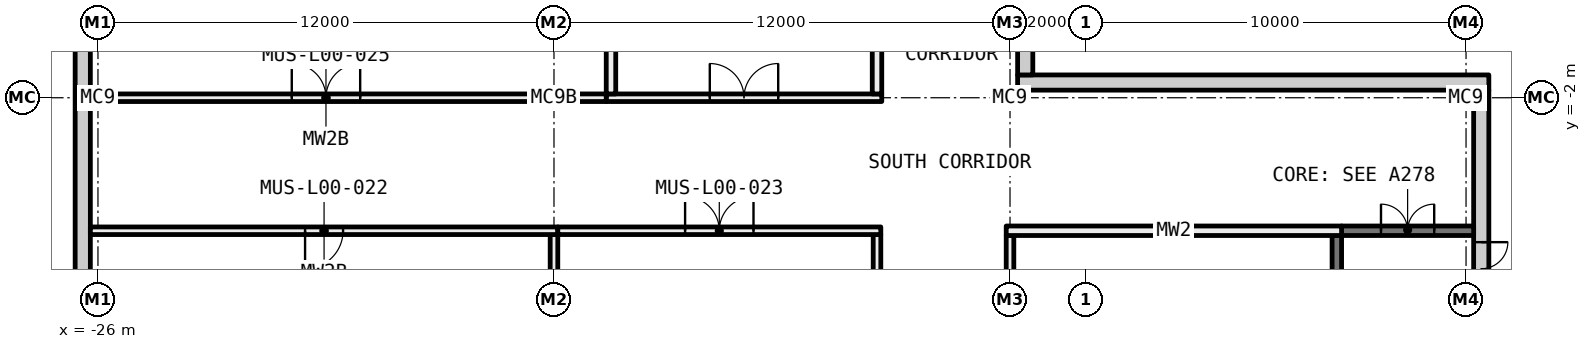
"""IFC4 building model, lengths in metres.
Left out: names, types, materials, properties, quantities, classifications, styles, units other than length and angle.
Written with IfcOpenShell. Run it as: python <this file> out.ifc"""

import sys

from ifc_helpers import new_model, si_unit, direction, frame, frame_2d, origin, origin_2d, place, context, subcontext, project, spatial, rectangle, i_section, extrude, element, fill, save


model = new_model("IFC4")
c1 = context("Model", 3, precision=1e-05, world=origin(), true_north=direction((0.0, 1.0)))
c2 = subcontext(c1, "Body", "Model", "MODEL_VIEW")
j1 = project(units=[si_unit("LENGTHUNIT", "METRE"), si_unit("PLANEANGLEUNIT", "RADIAN")], contexts=[c1])
p1 = place(None, origin())
s1 = spatial("IfcSite", under=j1, at=p1, CompositionType="ELEMENT")
p2 = place(p1, origin())
s2 = spatial("IfcBuilding", under=s1, at=p2, CompositionType="ELEMENT")
p3 = place(p2, origin())
s3 = spatial("IfcBuildingStorey", under=s2, at=p3, CompositionType="ELEMENT", Elevation=0.0)
for number, where, z_axis, x_axis in (
    (1, (-26.0, -2.0, -1.0), (0.0, 0.0, 1.0), (1.0, 0.0, 0.0)),
    (2, (-14.0, -2.0, -1.0), (0.0, 0.0, 1.0), (1.0, 0.0, 0.0)),
    (3, (-2.0, -2.0, -1.0), (0.0, 0.0, 1.0), (1.0, 0.0, 0.0)),
    (4, (10.0, -2.0, -1.0), (0.0, 0.0, 1.0), (1.0, 0.0, 0.0)),
):
    element("IfcColumn", number, at=place(p3, frame(where, z_axis=z_axis, x_axis=x_axis)), inside=s3, PredefinedType="COLUMN", context=c2, shape_type="SweptSolid", body=[
        extrude(i_section(OverallWidth=0.4, OverallDepth=0.4, WebThickness=0.013, FlangeThickness=0.021, FilletRadius=0.022, at=origin_2d()), origin(), (0.0, 0.0, 1.0), 6.6),
    ])
p4 = place(p3, frame((-14.0, -11.9, 0.0), z_axis=(0.0, 0.0, 1.0), x_axis=(0.0, 1.0, 0.0)))
e5 = element("IfcWall", 5, at=p4, inside=s3, PredefinedType="PARTITIONING", context=c2, shape_type="SweptSolid", body=[
    extrude(rectangle(XDim=6.3, YDim=0.2, at=frame_2d((3.15, 0.0))), origin(), (0.0, 0.0, 1.0), 5.012),
])
p5 = place(p3, frame((-26.2, -5.5, 0.0), z_axis=(0.0, 0.0, 1.0), x_axis=(1.0, 0.0, 0.0)))
e6 = element("IfcWall", 6, at=p5, inside=s3, PredefinedType="PARTITIONING", context=c2, shape_type="SweptSolid", body=[
    extrude(rectangle(XDim=12.3, YDim=0.2, at=frame_2d((6.15, 0.0))), origin(), (0.0, 0.0, 1.0), 5.6),
])
p6 = place(p5, frame((5.65, 0.0, 0.0)))
e7 = element("IfcOpeningElement", 7, at=p6, cuts=e6, PredefinedType="OPENING", context=c2, shape_type="SweptSolid", body=[
    extrude(rectangle(XDim=1.0, YDim=2.1, at=frame_2d((0.5, 1.05))), frame((0.0, 0.11, 0.0), z_axis=(0.0, -1.0, 0.0), x_axis=(1.0, 0.0, 0.0)), (0.0, 0.0, 1.0), 0.22),
])
p7 = place(p3, frame((-12.625, -2.0, 0.0), z_axis=(0.0, 0.0, 1.0), x_axis=(1.0, 0.0, 0.0)))
e8 = element("IfcWall", 8, at=p7, inside=s3, PredefinedType="PARTITIONING", context=c2, shape_type="SweptSolid", body=[
    extrude(rectangle(XDim=7.25, YDim=0.2, at=frame_2d((3.625, 0.0))), origin(), (0.0, 0.0, 1.0), 5.012),
])
p8 = place(p7, frame((2.725, 0.0, 0.0)))
e9 = element("IfcOpeningElement", 9, at=p8, cuts=e8, PredefinedType="OPENING", context=c2, shape_type="SweptSolid", body=[
    extrude(rectangle(XDim=1.8, YDim=2.1, at=frame_2d((0.9, 1.05))), frame((0.0, 0.11, 0.0), z_axis=(0.0, -1.0, 0.0), x_axis=(1.0, 0.0, 0.0)), (0.0, 0.0, 1.0), 0.22),
])
p9 = place(p3, frame((-5.5, -1.9, 0.0), z_axis=(0.0, 0.0, 1.0), x_axis=(0.0, 1.0, 0.0)))
e10 = element("IfcWall", 10, at=p9, inside=s3, PredefinedType="PARTITIONING", context=c2, shape_type="SweptSolid", body=[
    extrude(rectangle(XDim=2.975, YDim=0.25, at=frame_2d((1.487, 0.0))), origin(), (0.0, 0.0, 1.0), 5.6),
])
p10 = place(p3, frame((-25.8, -2.0, 0.0), z_axis=(0.0, 0.0, 1.0), x_axis=(1.0, 0.0, 0.0)))
e11 = element("IfcWall", 11, at=p10, inside=s3, PredefinedType="PARTITIONING", context=c2, shape_type="SweptSolid", body=[
    extrude(rectangle(XDim=11.6, YDim=0.2, at=frame_2d((5.8, 0.0))), origin(), (0.0, 0.0, 1.0), 5.012),
])
p11 = place(p10, frame((4.9, 0.0, 0.0)))
e12 = element("IfcOpeningElement", 12, at=p11, cuts=e11, PredefinedType="OPENING", context=c2, shape_type="SweptSolid", body=[
    extrude(rectangle(XDim=1.8, YDim=2.1, at=frame_2d((0.9, 1.05))), frame((0.0, 0.11, 0.0), z_axis=(0.0, -1.0, 0.0), x_axis=(1.0, 0.0, 0.0)), (0.0, 0.0, 1.0), 0.22),
])
p12 = place(p3, frame((-13.8, -2.0, 0.0), z_axis=(0.0, 0.0, 1.0), x_axis=(1.0, 0.0, 0.0)))
e13 = element("IfcWall", 13, at=p12, inside=s3, PredefinedType="PARTITIONING", context=c2, shape_type="SweptSolid", body=[
    extrude(rectangle(XDim=1.175, YDim=0.2, at=frame_2d((0.587, 0.0))), origin(), (0.0, 0.0, 1.0), 5.012),
])
p13 = place(p3, frame((-5.5, -14.875, 0.0), z_axis=(0.0, 0.0, 1.0), x_axis=(0.0, 1.0, 0.0)))
e14 = element("IfcWall", 14, at=p13, inside=s3, PredefinedType="PARTITIONING", context=c2, shape_type="SweptSolid", body=[
    extrude(rectangle(XDim=9.275, YDim=0.2, at=frame_2d((4.637, 0.0))), origin(), (0.0, 0.0, 1.0), 5.6),
])
p14 = place(p3, frame((-13.9, -5.5, 0.0), z_axis=(0.0, 0.0, 1.0), x_axis=(1.0, 0.0, 0.0)))
e15 = element("IfcWall", 15, at=p14, inside=s3, PredefinedType="PARTITIONING", context=c2, shape_type="SweptSolid", body=[
    extrude(rectangle(XDim=8.5, YDim=0.2, at=frame_2d((4.25, 0.0))), origin(), (0.0, 0.0, 1.0), 5.6),
])
p15 = place(p14, frame((3.35, 0.0, 0.0)))
e16 = element("IfcOpeningElement", 16, at=p15, cuts=e15, PredefinedType="OPENING", context=c2, shape_type="SweptSolid", body=[
    extrude(rectangle(XDim=1.8, YDim=2.1, at=frame_2d((0.9, 1.05))), frame((0.0, 0.11, 0.0), z_axis=(0.0, -1.0, 0.0), x_axis=(1.0, 0.0, 0.0)), (0.0, 0.0, 1.0), 0.22),
])
p16 = place(p3, frame((-2.0, -13.8, 0.0), z_axis=(0.0, 0.0, 1.0), x_axis=(0.0, 1.0, 0.0)))
e17 = element("IfcWall", 17, at=p16, inside=s3, PredefinedType="PARTITIONING", context=c2, shape_type="SweptSolid", body=[
    extrude(rectangle(XDim=8.175, YDim=0.2, at=frame_2d((4.087, 0.0))), origin(), (0.0, 0.0, 1.0), 5.012),
])
p17 = place(p16, frame((3.588, 0.0, 0.0)))
e18 = element("IfcOpeningElement", 18, at=p17, cuts=e17, PredefinedType="OPENING", context=c2, shape_type="SweptSolid", body=[
    extrude(rectangle(XDim=1.0, YDim=2.1, at=frame_2d((0.5, 1.05))), frame((0.0, 0.11, 0.0), z_axis=(0.0, -1.0, 0.0), x_axis=(1.0, 0.0, 0.0)), (0.0, 0.0, 1.0), 0.22),
])
p18 = place(p3, frame((-2.1, -5.5, 0.0), z_axis=(0.0, 0.0, 1.0), x_axis=(1.0, 0.0, 0.0)))
e19 = element("IfcWall", 19, at=p18, inside=s3, PredefinedType="PARTITIONING", context=c2, shape_type="SweptSolid", body=[
    extrude(rectangle(XDim=8.825, YDim=0.25, at=frame_2d((4.413, 0.0))), origin(), (0.0, 0.0, 1.0), 5.6),
])
p19 = place(p3, frame((6.725, -5.5, -1.0), z_axis=(0.0, 0.0, 1.0), x_axis=(1.0, 0.0, 0.0)))
e20 = element("IfcWall", 20, at=p19, inside=s3, PredefinedType="SHEAR", context=c2, shape_type="SweptSolid", body=[
    extrude(rectangle(XDim=3.475, YDim=0.25, at=frame_2d((1.737, 0.0))), origin(), (0.0, 0.0, 1.0), 6.6),
])
p20 = place(p19, frame((1.037, 0.0, 1.0)))
e21 = element("IfcOpeningElement", 21, at=p20, cuts=e20, PredefinedType="OPENING", context=c2, shape_type="SweptSolid", body=[
    extrude(rectangle(XDim=1.4, YDim=2.1, at=frame_2d((0.7, 1.05))), frame((0.0, 0.135, 0.0), z_axis=(0.0, -1.0, 0.0), x_axis=(1.0, 0.0, 0.0)), (0.0, 0.0, 1.0), 0.27),
])
p21 = place(p3, frame((-12.5, -1.9, 0.0), z_axis=(0.0, 0.0, 1.0), x_axis=(0.0, 1.0, 0.0)))
e22 = element("IfcWall", 22, at=p21, inside=s3, PredefinedType="PARTITIONING", context=c2, shape_type="SweptSolid", body=[
    extrude(rectangle(XDim=2.975, YDim=0.25, at=frame_2d((1.487, 0.0))), origin(), (0.0, 0.0, 1.0), 5.6),
])
p22 = place(p3, frame((6.6, -14.875, -1.0), z_axis=(0.0, 0.0, 1.0), x_axis=(0.0, 1.0, 0.0)))
e23 = element("IfcWall", 23, at=p22, inside=s3, PredefinedType="SHEAR", context=c2, shape_type="SweptSolid", body=[
    extrude(rectangle(XDim=9.25, YDim=0.25, at=frame_2d((4.625, 0.0))), origin(), (0.0, 0.0, 1.0), 6.6),
])
p23 = place(p3, frame((-26.4, -26.2, -0.4), z_axis=(0.0, 0.0, 1.0), x_axis=(0.0, 1.0, 0.0)))
e24 = element("IfcWall", 24, at=p23, inside=s3, PredefinedType="STANDARD", context=c2, shape_type="SweptSolid", body=[
    extrude(rectangle(XDim=72.4, YDim=0.4, at=frame_2d((36.2, 0.0))), origin(), (0.0, 0.0, 1.0), 6.0),
])
p24 = place(p23, frame((29.4, 0.0, 0.4)))
e25 = element("IfcOpeningElement", 25, at=p24, cuts=e24, PredefinedType="OPENING", context=c2, shape_type="SweptSolid", body=[
    extrude(rectangle(XDim=3.6, YDim=4.2, at=frame_2d((1.8, 2.1))), frame((0.0, 0.21, 0.0), z_axis=(0.0, -1.0, 0.0), x_axis=(1.0, 0.0, 0.0)), (0.0, 0.0, 1.0), 0.42),
])
p25 = place(p23, frame((2.0, 0.0, 0.4)))
e26 = element("IfcOpeningElement", 26, at=p25, cuts=e24, PredefinedType="OPENING", context=c2, shape_type="SweptSolid", body=[
    extrude(rectangle(XDim=2.4, YDim=2.4, at=frame_2d((1.2, 1.2))), frame((0.0, 0.21, 0.0), z_axis=(0.0, -1.0, 0.0), x_axis=(1.0, 0.0, 0.0)), (0.0, 0.0, 1.0), 0.42),
])
p26 = place(p23, frame((7.5, 0.0, 0.4)))
e27 = element("IfcOpeningElement", 27, at=p26, cuts=e24, PredefinedType="OPENING", context=c2, shape_type="SweptSolid", body=[
    extrude(rectangle(XDim=2.4, YDim=2.4, at=frame_2d((1.2, 1.2))), frame((0.0, 0.21, 0.0), z_axis=(0.0, -1.0, 0.0), x_axis=(1.0, 0.0, 0.0)), (0.0, 0.0, 1.0), 0.42),
])
p27 = place(p3, frame((10.4, -15.0, -0.4), z_axis=(0.0, 0.0, 1.0), x_axis=(0.0, 1.0, 0.0)))
e28 = element("IfcWall", 28, at=p27, inside=s3, PredefinedType="STANDARD", context=c2, shape_type="SweptSolid", body=[
    extrude(rectangle(XDim=13.2, YDim=0.4, at=frame_2d((6.6, 0.0))), origin(), (0.0, 0.0, 1.0), 6.0),
])
p28 = place(p27, frame((7.8, 0.0, 0.4)))
e29 = element("IfcOpeningElement", 29, at=p28, cuts=e28, PredefinedType="OPENING", context=c2, shape_type="SweptSolid", body=[
    extrude(rectangle(XDim=1.4, YDim=2.1, at=frame_2d((0.7, 1.05))), frame((0.0, 0.21, 0.0), z_axis=(0.0, -1.0, 0.0), x_axis=(1.0, 0.0, 0.0)), (0.0, 0.0, 1.0), 0.42),
])
p29 = place(p3, frame((-1.8, -1.6, -0.4), z_axis=(0.0, 0.0, 1.0), x_axis=(1.0, 0.0, 0.0)))
e30 = element("IfcWall", 30, at=p29, inside=s3, PredefinedType="STANDARD", context=c2, shape_type="SweptSolid", body=[
    extrude(rectangle(XDim=12.4, YDim=0.4, at=frame_2d((6.2, 0.0))), origin(), (0.0, 0.0, 1.0), 6.0),
])
p30 = place(p3, frame((-1.6, -1.4, -0.4), z_axis=(0.0, 0.0, 1.0), x_axis=(0.0, 1.0, 0.0)))
e31 = element("IfcWall", 31, at=p30, inside=s3, PredefinedType="STANDARD", context=c2, shape_type="SweptSolid", body=[
    extrude(rectangle(XDim=47.6, YDim=0.4, at=frame_2d((23.8, 0.0))), origin(), (0.0, 0.0, 1.0), 6.0),
])
p31 = place(p28, frame((1.4, 0.0, 0.0), x_axis=(-1.0, 0.0, 0.0)))
e32 = element("IfcDoor", 32, at=p31, inside=s3, OperationType="DOUBLE_DOOR_SINGLE_SWING", PredefinedType="DOOR", context=c2, shape_type="SweptSolid", body=[
    extrude(rectangle(XDim=1.4, YDim=2.1, at=frame_2d((0.7, 1.05))), frame((0.0, 0.025, 0.0), z_axis=(0.0, -1.0, 0.0), x_axis=(1.0, 0.0, 0.0)), (0.0, 0.0, 1.0), 0.05),
])
fill(e29, e32)
p32 = place(p20, origin())
e33 = element("IfcDoor", 33, at=p32, inside=s3, OperationType="DOUBLE_DOOR_SINGLE_SWING", PredefinedType="DOOR", context=c2, shape_type="SweptSolid", body=[
    extrude(rectangle(XDim=1.4, YDim=2.1, at=frame_2d((0.7, 1.05))), frame((0.0, 0.025, 0.0), z_axis=(0.0, -1.0, 0.0), x_axis=(1.0, 0.0, 0.0)), (0.0, 0.0, 1.0), 0.05),
])
fill(e21, e33)
p33 = place(p8, origin())
e34 = element("IfcDoor", 34, at=p33, inside=s3, OperationType="DOUBLE_DOOR_SINGLE_SWING", PredefinedType="DOOR", context=c2, shape_type="SweptSolid", body=[
    extrude(rectangle(XDim=1.8, YDim=2.1, at=frame_2d((0.9, 1.05))), frame((0.0, 0.025, 0.0), z_axis=(0.0, -1.0, 0.0), x_axis=(1.0, 0.0, 0.0)), (0.0, 0.0, 1.0), 0.05),
])
fill(e9, e34)
p34 = place(p6, frame((1.0, 0.0, 0.0), x_axis=(-1.0, 0.0, 0.0)))
e35 = element("IfcDoor", 35, at=p34, inside=s3, OperationType="SINGLE_SWING_LEFT", PredefinedType="DOOR", context=c2, shape_type="SweptSolid", body=[
    extrude(rectangle(XDim=1.0, YDim=2.1, at=frame_2d((0.5, 1.05))), frame((0.0, 0.025, 0.0), z_axis=(0.0, -1.0, 0.0), x_axis=(1.0, 0.0, 0.0)), (0.0, 0.0, 1.0), 0.05),
])
fill(e7, e35)
p35 = place(p15, origin())
e36 = element("IfcDoor", 36, at=p35, inside=s3, OperationType="DOUBLE_DOOR_SINGLE_SWING", PredefinedType="DOOR", context=c2, shape_type="SweptSolid", body=[
    extrude(rectangle(XDim=1.8, YDim=2.1, at=frame_2d((0.9, 1.05))), frame((0.0, 0.025, 0.0), z_axis=(0.0, -1.0, 0.0), x_axis=(1.0, 0.0, 0.0)), (0.0, 0.0, 1.0), 0.05),
])
fill(e16, e36)
p36 = place(p11, origin())
e37 = element("IfcDoor", 37, at=p36, inside=s3, OperationType="DOUBLE_DOOR_SINGLE_SWING", PredefinedType="DOOR", context=c2, shape_type="SweptSolid", body=[
    extrude(rectangle(XDim=1.8, YDim=2.1, at=frame_2d((0.9, 1.05))), frame((0.0, 0.025, 0.0), z_axis=(0.0, -1.0, 0.0), x_axis=(1.0, 0.0, 0.0)), (0.0, 0.0, 1.0), 0.05),
])
fill(e12, e37)
save(model, sys.argv[1])
